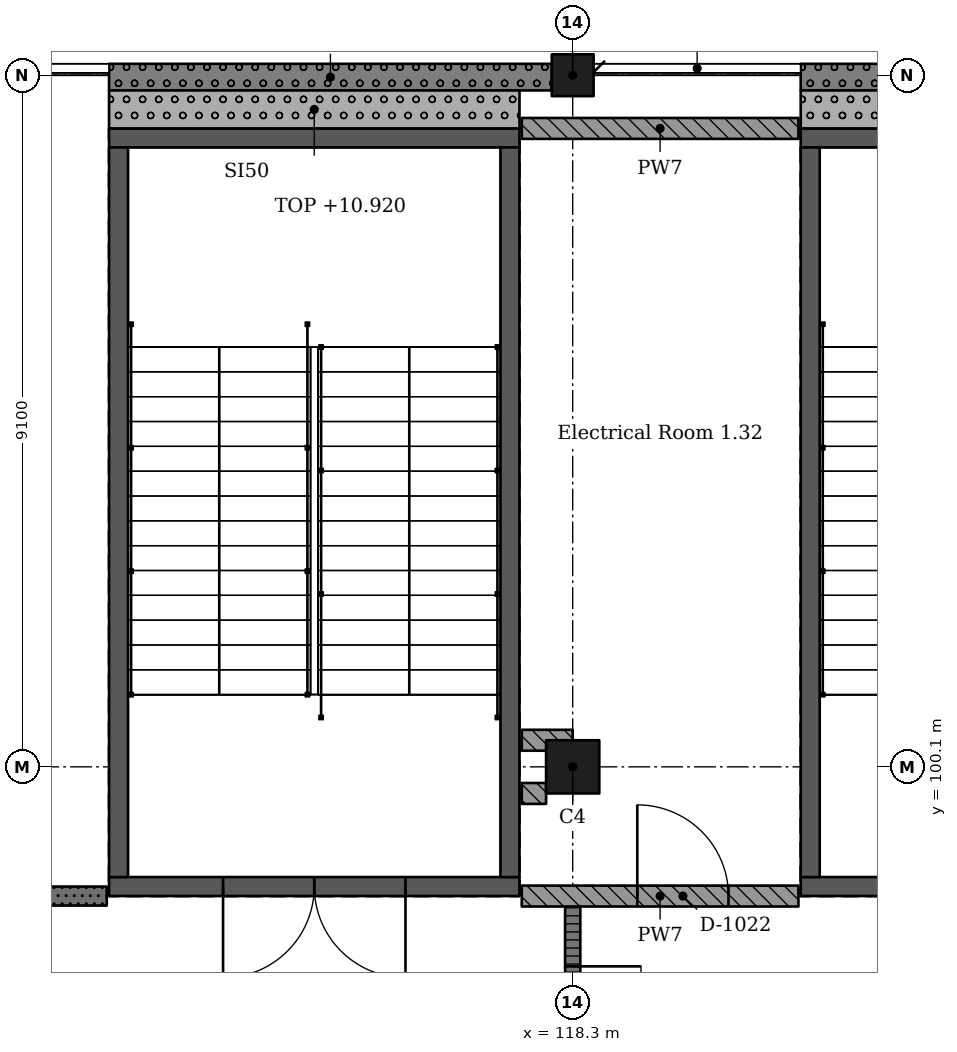
"""IFC4 building model, lengths in metres.
Left out: names, types, materials, properties, quantities, classifications, styles, units other than length and angle.
Written with IfcOpenShell. Run it as: python <this file> out.ifc"""

import sys

from ifc_helpers import new_model, si_unit, direction, frame, frame_2d, origin, origin_2d, place, context, subcontext, project, spatial, rectangle, extrude, element, fill, save


model = new_model("IFC4")
c1 = context("Model", 3, precision=1e-05, world=origin(), true_north=direction((0.0, 1.0)))
c2 = subcontext(c1, "Body", "Model", "MODEL_VIEW")
j1 = project(units=[si_unit("LENGTHUNIT", "METRE"), si_unit("PLANEANGLEUNIT", "RADIAN")], contexts=[c1])
p1 = place(None, origin())
s1 = spatial("IfcSite", under=j1, at=p1, CompositionType="ELEMENT")
p2 = place(p1, origin())
s2 = spatial("IfcBuilding", under=s1, at=p2, CompositionType="ELEMENT")
p3 = place(p2, frame((0.0, 0.0, 6.37)))
s3 = spatial("IfcBuildingStorey", under=s2, at=p3, CompositionType="ELEMENT", Elevation=6.37)
p4 = place(p3, frame((118.3, 100.1, 0.0), z_axis=(0.0, 0.0, 1.0), x_axis=(1.0, 0.0, 0.0)))
e1 = element("IfcColumn", 1, at=p4, inside=s3, PredefinedType="COLUMN", context=c2, shape_type="SweptSolid", body=[
    extrude(rectangle(XDim=0.7, YDim=0.7, at=origin_2d()), origin(), (0.0, 0.0, 1.0), 4.55),
])
p5 = place(p3, frame((118.3, 109.2, 0.0), z_axis=(0.0, 0.0, 1.0), x_axis=(1.0, 0.0, 0.0)))
e2 = element("IfcColumn", 2, at=p5, inside=s3, PredefinedType="COLUMN", context=c2, shape_type="SweptSolid", body=[
    extrude(rectangle(XDim=0.55, YDim=0.55, at=origin_2d()), origin(), (0.0, 0.0, 1.0), 4.55),
])
p6 = place(p3, frame((126.7, 98.525, 0.0), z_axis=(0.0, 0.0, 1.0), x_axis=(-1.0, 0.0, 0.0)))
e3 = element("IfcWall", 3, at=p6, inside=s3, PredefinedType="SHEAR", context=c2, shape_type="SweptSolid", body=[
    extrude(rectangle(XDim=5.4, YDim=0.25, at=frame_2d((2.7, 0.0))), origin(), (0.0, 0.0, 1.0), 4.55),
])
p7 = place(p6, frame((1.5, 0.0, 0.0)))
e4 = element("IfcOpeningElement", 4, at=p7, cuts=e3, PredefinedType="OPENING", context=c2, shape_type="SweptSolid", body=[
    extrude(rectangle(XDim=2.4, YDim=2.1, at=frame_2d((1.2, 1.05))), frame((0.0, 0.135, 0.0), z_axis=(0.0, -1.0, 0.0), x_axis=(1.0, 0.0, 0.0)), (0.0, 0.0, 1.0), 0.27),
])
p8 = place(p3, frame((126.7, 108.375, 0.0), z_axis=(0.0, 0.0, 1.0), x_axis=(-1.0, 0.0, 0.0)))
e5 = element("IfcWall", 5, at=p8, inside=s3, PredefinedType="SHEAR", context=c2, shape_type="SweptSolid", body=[
    extrude(rectangle(XDim=5.4, YDim=0.25, at=frame_2d((2.7, 0.0))), origin(), (0.0, 0.0, 1.0), 4.55),
])
p9 = place(p3, frame((121.425, 108.25, 0.0), z_axis=(0.0, 0.0, 1.0), x_axis=(0.0, -1.0, 0.0)))
e6 = element("IfcWall", 6, at=p9, inside=s3, PredefinedType="SHEAR", context=c2, shape_type="SweptSolid", body=[
    extrude(rectangle(XDim=9.6, YDim=0.25, at=frame_2d((4.8, 0.0))), origin(), (0.0, 0.0, 1.0), 4.55),
])
p10 = place(p3, frame((117.6, 98.525, 0.0), z_axis=(0.0, 0.0, 1.0), x_axis=(-1.0, 0.0, 0.0)))
e7 = element("IfcWall", 7, at=p10, inside=s3, PredefinedType="SHEAR", context=c2, shape_type="SweptSolid", body=[
    extrude(rectangle(XDim=5.4, YDim=0.25, at=frame_2d((2.7, 0.0))), origin(), (0.0, 0.0, 1.0), 4.55),
])
p11 = place(p10, frame((1.5, 0.0, 0.0)))
e8 = element("IfcOpeningElement", 8, at=p11, cuts=e7, PredefinedType="OPENING", context=c2, shape_type="SweptSolid", body=[
    extrude(rectangle(XDim=2.4, YDim=2.1, at=frame_2d((1.2, 1.05))), frame((0.0, 0.135, 0.0), z_axis=(0.0, -1.0, 0.0), x_axis=(1.0, 0.0, 0.0)), (0.0, 0.0, 1.0), 0.27),
])
p12 = place(p3, frame((117.6, 108.375, 0.0), z_axis=(0.0, 0.0, 1.0), x_axis=(-1.0, 0.0, 0.0)))
e9 = element("IfcWall", 9, at=p12, inside=s3, PredefinedType="SHEAR", context=c2, shape_type="SweptSolid", body=[
    extrude(rectangle(XDim=5.4, YDim=0.25, at=frame_2d((2.7, 0.0))), origin(), (0.0, 0.0, 1.0), 4.55),
])
for number, where, z_axis, x_axis in (
    (10, (112.325, 108.25, 0.0), (0.0, 0.0, 1.0), (0.0, -1.0, 0.0)),
    (11, (117.475, 108.25, 0.0), (0.0, 0.0, 1.0), (0.0, -1.0, 0.0)),
):
    element("IfcWall", number, at=place(p3, frame(where, z_axis=z_axis, x_axis=x_axis)), inside=s3, PredefinedType="SHEAR", context=c2, shape_type="SweptSolid", body=[
        extrude(rectangle(XDim=9.6, YDim=0.25, at=frame_2d((4.8, 0.0))), origin(), (0.0, 0.0, 1.0), 4.55),
    ])
for number, where, z_axis, x_axis in (
    (12, (127.125, 109.175, 0.0), (0.0, 0.0, 1.0), (-1.0, 0.0, 0.0)),
    (13, (118.025, 109.175, 0.0), (0.0, 0.0, 1.0), (-1.0, 0.0, 0.0)),
):
    element("IfcWall", number, at=place(p3, frame(where, z_axis=z_axis, x_axis=x_axis)), inside=s3, PredefinedType="SOLIDWALL", context=c2, shape_type="SweptSolid", body=[
        extrude(rectangle(XDim=5.825, YDim=0.35, at=frame_2d((2.913, 0.0))), origin(), (0.0, 0.0, 1.0), 3.5),
    ])
p13 = place(p3, frame((121.3, 108.75, 0.0), z_axis=(0.0, 0.0, 1.0), x_axis=(1.0, 0.0, 0.0)))
e14 = element("IfcWall", 14, at=p13, inside=s3, PredefinedType="SOLIDWALL", context=c2, shape_type="SweptSolid", body=[
    extrude(rectangle(XDim=5.4, YDim=0.5, at=frame_2d((2.7, 0.0))), origin(), (0.0, 0.0, 1.0), 4.55),
])
p14 = place(p3, frame((112.2, 108.75, 0.0), z_axis=(0.0, 0.0, 1.0), x_axis=(1.0, 0.0, 0.0)))
e15 = element("IfcWall", 15, at=p14, inside=s3, PredefinedType="SOLIDWALL", context=c2, shape_type="SweptSolid", body=[
    extrude(rectangle(XDim=5.4, YDim=0.5, at=frame_2d((2.7, 0.0))), origin(), (0.0, 0.0, 1.0), 4.55),
])
p15 = place(p3, frame((109.475, 98.4, 0.0), z_axis=(0.0, 0.0, 1.0), x_axis=(1.0, 0.0, 0.0)))
e16 = element("IfcWall", 16, at=p15, inside=s3, PredefinedType="SOLIDWALL", context=c2, shape_type="SweptSolid", body=[
    extrude(rectangle(XDim=2.695, YDim=0.25, at=frame_2d((1.347, 0.0))), origin(), (0.0, 0.0, 1.0), 4.25),
])
p16 = place(p3, frame((117.63, 98.4, 0.0), z_axis=(0.0, 0.0, 1.0), x_axis=(1.0, 0.0, 0.0)))
e17 = element("IfcWall", 17, at=p16, inside=s3, PredefinedType="SOLIDWALL", context=c2, shape_type="SweptSolid", body=[
    extrude(rectangle(XDim=3.64, YDim=0.275, at=frame_2d((1.82, 0.0))), origin(), (0.0, 0.0, 1.0), 4.25),
])
p17 = place(p16, frame((1.52, 0.0, 0.0)))
e18 = element("IfcOpeningElement", 18, at=p17, cuts=e17, PredefinedType="OPENING", context=c2, shape_type="SweptSolid", body=[
    extrude(rectangle(XDim=1.2, YDim=2.4, at=frame_2d((0.6, 1.2))), frame((0.0, 0.147, 0.0), z_axis=(0.0, -1.0, 0.0), x_axis=(1.0, 0.0, 0.0)), (0.0, 0.0, 1.0), 0.295),
])
p18 = place(p3, frame((117.63, 99.75, 0.0), z_axis=(0.0, 0.0, 1.0), x_axis=(1.0, 0.0, 0.0)))
e19 = element("IfcWall", 19, at=p18, inside=s3, PredefinedType="SOLIDWALL", context=c2, shape_type="SweptSolid", body=[
    extrude(rectangle(XDim=0.32, YDim=0.275, at=frame_2d((0.16, 0.0))), origin(), (0.0, 0.0, 1.0), 4.25),
])
p19 = place(p3, frame((117.63, 100.45, 0.0), z_axis=(0.0, 0.0, 1.0), x_axis=(1.0, 0.0, 0.0)))
e20 = element("IfcWall", 20, at=p19, inside=s3, PredefinedType="SOLIDWALL", context=c2, shape_type="SweptSolid", body=[
    extrude(rectangle(XDim=0.67, YDim=0.275, at=frame_2d((0.335, 0.0))), origin(), (0.0, 0.0, 1.0), 4.25),
])
p20 = place(p3, frame((117.63, 108.5, 0.0), z_axis=(0.0, 0.0, 1.0), x_axis=(1.0, 0.0, 0.0)))
e21 = element("IfcWall", 21, at=p20, inside=s3, PredefinedType="SOLIDWALL", context=c2, shape_type="SweptSolid", body=[
    extrude(rectangle(XDim=3.64, YDim=0.275, at=frame_2d((1.82, 0.0))), origin(), (0.0, 0.0, 1.0), 4.25),
])
p21 = place(p3, frame((118.3, 91.425, 0.0), z_axis=(0.0, 0.0, 1.0), x_axis=(0.0, 1.0, 0.0)))
e22 = element("IfcWall", 22, at=p21, inside=s3, PredefinedType="PARTITIONING", context=c2, shape_type="SweptSolid", body=[
    extrude(rectangle(XDim=6.837, YDim=0.2, at=frame_2d((3.419, 0.0))), origin(), (0.0, 0.0, 1.0), 3.55),
])
p22 = place(p21, frame((0.85, 0.0, 0.0)))
e23 = element("IfcOpeningElement", 23, at=p22, cuts=e22, PredefinedType="OPENING", context=c2, shape_type="SweptSolid", body=[
    extrude(rectangle(XDim=1.8, YDim=2.4, at=frame_2d((0.9, 1.2))), frame((0.0, 0.11, 0.0), z_axis=(0.0, -1.0, 0.0), x_axis=(1.0, 0.0, 0.0)), (0.0, 0.0, 1.0), 0.22),
])
p23 = place(p21, frame((4.25, 0.0, 0.0)))
e24 = element("IfcOpeningElement", 24, at=p23, cuts=e22, PredefinedType="OPENING", context=c2, shape_type="SweptSolid", body=[
    extrude(rectangle(XDim=1.8, YDim=2.4, at=frame_2d((0.9, 1.2))), frame((0.0, 0.11, 0.0), z_axis=(0.0, -1.0, 0.0), x_axis=(1.0, 0.0, 0.0)), (0.0, 0.0, 1.0), 0.22),
])
p24 = place(p17, origin())
e25 = element("IfcDoor", 25, at=p24, inside=s3, OperationType="SINGLE_SWING_RIGHT", PredefinedType="DOOR", context=c2, shape_type="SweptSolid", body=[
    extrude(rectangle(XDim=1.2, YDim=2.4, at=frame_2d((0.6, 1.2))), frame((0.0, 0.025, 0.0), z_axis=(0.0, -1.0, 0.0), x_axis=(1.0, 0.0, 0.0)), (0.0, 0.0, 1.0), 0.05),
])
fill(e18, e25)
p25 = place(p23, origin())
e26 = element("IfcDoor", 26, at=p25, inside=s3, OperationType="DOUBLE_DOOR_SINGLE_SWING", PredefinedType="DOOR", context=c2, shape_type="SweptSolid", body=[
    extrude(rectangle(XDim=1.8, YDim=2.4, at=frame_2d((0.9, 1.2))), frame((0.0, 0.025, 0.0), z_axis=(0.0, -1.0, 0.0), x_axis=(1.0, 0.0, 0.0)), (0.0, 0.0, 1.0), 0.05),
])
fill(e24, e26)
p26 = place(p11, origin())
e27 = element("IfcDoor", 27, at=p26, inside=s3, OperationType="DOUBLE_DOOR_SINGLE_SWING", PredefinedType="DOOR", context=c2, shape_type="SweptSolid", body=[
    extrude(rectangle(XDim=2.4, YDim=2.1, at=frame_2d((1.2, 1.05))), frame((0.0, 0.025, 0.0), z_axis=(0.0, -1.0, 0.0), x_axis=(1.0, 0.0, 0.0)), (0.0, 0.0, 1.0), 0.05),
])
fill(e8, e27)
save(model, sys.argv[1])
